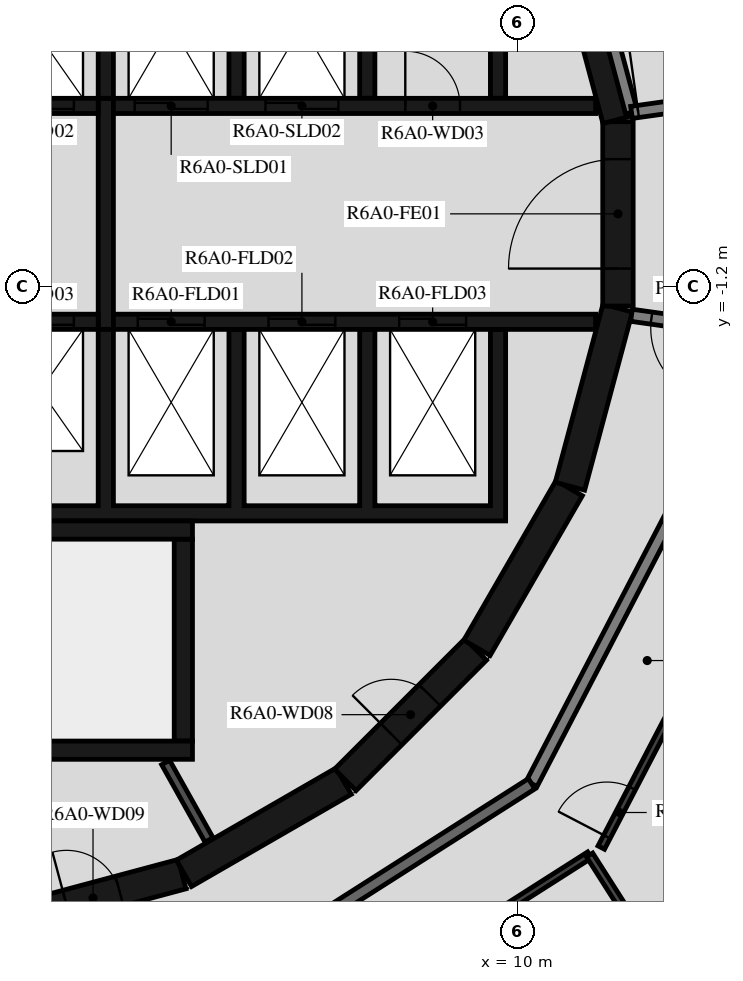
"""IFC4 building model, lengths in metres.
Left out: names, types, materials, properties, quantities, classifications, styles, units other than length and angle.
Written with IfcOpenShell. Run it as: python <this file> out.ifc"""

import sys

from ifc_helpers import new_model, si_unit, direction, frame, frame_2d, origin, place, context, subcontext, project, spatial, polyline, rectangle, outline, extrude, element, fill, save


model = new_model("IFC4")
c1 = context("Model", 3, precision=1e-05, world=origin(), true_north=direction((0.0, 1.0)))
c2 = subcontext(c1, "Body", "Model", "MODEL_VIEW")
j1 = project(units=[si_unit("LENGTHUNIT", "METRE"), si_unit("PLANEANGLEUNIT", "RADIAN")], contexts=[c1])
p1 = place(None, origin())
s1 = spatial("IfcSite", under=j1, at=p1, CompositionType="ELEMENT")
p2 = place(p1, origin())
s2 = spatial("IfcBuilding", under=s1, at=p2, CompositionType="ELEMENT")
p3 = place(p2, frame((0.0, 0.0, 226.7)))
s3 = spatial("IfcBuildingStorey", under=s2, at=p3, CompositionType="ELEMENT", Elevation=226.7)
p4 = place(p3, frame((1.55, -11.643, 0.0), z_axis=(0.0, 0.0, 1.0), x_axis=(0.965948410781, 0.258734743916, 0.0)))
e1 = element("IfcWall", 1, at=p4, inside=s3, PredefinedType="SHEAR", context=c2, shape_type="SweptSolid", body=[
    extrude(rectangle(XDim=3.033, YDim=0.5, at=frame_2d((1.516, 0.0))), origin(), (0.0, 0.0, 1.0), 3.12),
])
p5 = place(p4, frame((1.066, 0.0, 0.0)))
e2 = element("IfcOpeningElement", 2, at=p5, cuts=e1, PredefinedType="OPENING", context=c2, shape_type="SweptSolid", body=[
    extrude(rectangle(XDim=0.9, YDim=2.1, at=frame_2d((0.45, 1.05))), frame((0.0, 0.26, 0.0), z_axis=(0.0, -1.0, 0.0), x_axis=(1.0, 0.0, 0.0)), (0.0, 0.0, 1.0), 0.52),
])
p6 = place(p3, frame((4.51, -10.845, 0.0), z_axis=(0.0, 0.0, 1.0), x_axis=(0.865975092491, 0.500087131594, 0.0)))
e3 = element("IfcWall", 3, at=p6, inside=s3, PredefinedType="SHEAR", context=c2, shape_type="SweptSolid", body=[
    extrude(rectangle(XDim=3.033, YDim=0.5, at=frame_2d((1.516, 0.0))), origin(), (0.0, 0.0, 1.0), 3.12),
])
p7 = place(p3, frame((7.164, -9.308, 0.0), z_axis=(0.0, 0.0, 1.0), x_axis=(0.707106781187, 0.707106781187, 0.0)))
e4 = element("IfcWall", 4, at=p7, inside=s3, PredefinedType="SHEAR", context=c2, shape_type="SweptSolid", body=[
    extrude(rectangle(XDim=3.032, YDim=0.5, at=frame_2d((1.516, 0.0))), origin(), (0.0, 0.0, 1.0), 3.12),
])
p8 = place(p7, frame((1.066, 0.0, 0.0)))
e5 = element("IfcOpeningElement", 5, at=p8, cuts=e4, PredefinedType="OPENING", context=c2, shape_type="SweptSolid", body=[
    extrude(rectangle(XDim=0.9, YDim=2.1, at=frame_2d((0.45, 1.05))), frame((0.0, 0.26, 0.0), z_axis=(0.0, -1.0, 0.0), x_axis=(1.0, 0.0, 0.0)), (0.0, 0.0, 1.0), 0.52),
])
for number, where, z_axis, x_axis in (
    (6, (9.329, -7.137, 0.0), (0.0, 0.0, 1.0), (0.5, 0.866, 0.0)),
    (7, (10.858, -4.479, 0.0), (0.0, 0.0, 1.0), (0.259, 0.966, 0.0)),
):
    element("IfcWall", number, at=place(p3, frame(where, z_axis=z_axis, x_axis=x_axis)), inside=s3, PredefinedType="SHEAR", context=c2, shape_type="SweptSolid", body=[
        extrude(rectangle(XDim=3.033, YDim=0.5, at=frame_2d((1.516, 0.0))), origin(), (0.0, 0.0, 1.0), 3.12),
    ])
p9 = place(p3, frame((11.647, -1.516, 0.0), z_axis=(0.0, 0.0, 1.0), x_axis=(0.0, 1.0, 0.0)))
e8 = element("IfcWall", 8, at=p9, inside=s3, PredefinedType="SHEAR", context=c2, shape_type="SweptSolid", body=[
    extrude(rectangle(XDim=3.033, YDim=0.5, at=frame_2d((1.516, 0.0))), origin(), (0.0, 0.0, 1.0), 3.12),
])
p10 = place(p9, frame((0.616, 0.0, 0.0)))
e9 = element("IfcOpeningElement", 9, at=p10, cuts=e8, PredefinedType="OPENING", context=c2, shape_type="SweptSolid", body=[
    extrude(rectangle(XDim=1.8, YDim=2.1, at=frame_2d((0.9, 1.05))), frame((0.0, 0.26, 0.0), z_axis=(0.0, -1.0, 0.0), x_axis=(1.0, 0.0, 0.0)), (0.0, 0.0, 1.0), 0.52),
])
p11 = place(p3, frame((11.643, 1.55, 0.0), z_axis=(0.0, 0.0, 1.0), x_axis=(-0.258734743916, 0.965948410781, 0.0)))
e10 = element("IfcWall", 10, at=p11, inside=s3, PredefinedType="SHEAR", context=c2, shape_type="SweptSolid", body=[
    extrude(rectangle(XDim=3.033, YDim=0.5, at=frame_2d((1.516, 0.0))), origin(), (0.0, 0.0, 1.0), 3.12),
])
p12 = place(p3, frame((-2.4, -5.2, 0.0), z_axis=(0.0, 0.0, 1.0), x_axis=(1.0, 0.0, 0.0)))
e11 = element("IfcWall", 11, at=p12, inside=s3, PredefinedType="SHEAR", context=c2, shape_type="SweptSolid", body=[
    extrude(rectangle(XDim=7.05, YDim=0.3, at=frame_2d((3.525, 0.0))), origin(), (0.0, 0.0, 1.0), 3.12),
])
p13 = place(p3, frame((4.5, -8.67, 0.0), z_axis=(0.0, 0.0, 1.0), x_axis=(0.0, 1.0, 0.0)))
e12 = element("IfcWall", 12, at=p13, inside=s3, PredefinedType="SHEAR", context=c2, shape_type="SweptSolid", body=[
    extrude(rectangle(XDim=3.32, YDim=0.3, at=frame_2d((1.66, 0.0))), origin(), (0.0, 0.0, 1.0), 3.12),
])
p14 = place(p3, frame((0.1, -8.82, 0.0), z_axis=(0.0, 0.0, 1.0), x_axis=(1.0, 0.0, 0.0)))
e13 = element("IfcWall", 13, at=p14, inside=s3, PredefinedType="SHEAR", context=c2, shape_type="SweptSolid", body=[
    extrude(rectangle(XDim=4.55, YDim=0.3, at=frame_2d((2.275, 0.0))), origin(), (0.0, 0.0, 1.0), 3.12),
])
p15 = place(p3, origin())
e14 = element("IfcWall", 14, at=p15, inside=s3, PredefinedType="SHEAR", context=c2, shape_type="SweptSolid", body=[
    extrude(outline(polyline([(-9.55, 4.8), (-5.5, 4.8), (-5.5, 1.9), (-5.25, 1.9), (-5.25, 4.8), (-1.2, 4.8), (-1.2, 1.9), (-0.95, 1.9), (-0.95, 4.8), (0.95, 4.8), (0.95, 1.9), (1.2, 1.9), (1.2, 4.8), (3.1, 4.8), (3.1, 1.9), (3.35, 1.9), (3.35, 4.8), (5.25, 4.8), (5.25, 1.9), (5.5, 1.9), (5.5, 4.8), (7.4, 4.8), (7.4, 1.9), (7.65, 1.9), (7.65, 4.8), (9.55, 4.8), (9.55, 1.9), (9.8, 1.9), (9.8, 4.8), (9.8, 5.05), (-9.8, 5.05), (-9.8, 4.8), (-9.8, 1.9), (-9.55, 1.9), (-9.55, 4.8)])), origin(), (0.0, 0.0, 1.0), 3.12),
])
p16 = place(p3, origin())
e15 = element("IfcWall", 15, at=p16, inside=s3, PredefinedType="SHEAR", context=c2, shape_type="SweptSolid", body=[
    extrude(outline(polyline([(9.8, -5.05), (9.8, -4.8), (9.8, -1.9), (9.55, -1.9), (9.55, -4.8), (7.65, -4.8), (7.65, -1.9), (7.4, -1.9), (7.4, -4.8), (5.5, -4.8), (5.5, -1.9), (5.25, -1.9), (5.25, -4.8), (3.35, -4.8), (3.35, -1.9), (3.1, -1.9), (3.1, -4.8), (1.2, -4.8), (1.2, -1.9), (0.95, -1.9), (0.95, -4.8), (-0.95, -4.8), (-0.95, -1.9), (-1.2, -1.9), (-1.2, -4.8), (-5.25, -4.8), (-5.25, -1.9), (-5.5, -1.9), (-5.5, -4.8), (-7.4, -4.8), (-7.4, -1.9), (-7.65, -1.9), (-7.65, -4.8), (-9.55, -4.8), (-9.55, -1.9), (-9.8, -1.9), (-9.8, -4.8), (-9.8, -5.05), (9.8, -5.05)])), origin(), (0.0, 0.0, 1.0), 3.12),
])
p17 = place(p3, frame((-11.28, 1.775, 0.0), z_axis=(0.0, 0.0, 1.0), x_axis=(1.0, 0.0, 0.0)))
e16 = element("IfcWall", 16, at=p17, inside=s3, PredefinedType="SHEAR", context=c2, shape_type="SweptSolid", body=[
    extrude(rectangle(XDim=14.38, YDim=0.25, at=frame_2d((7.19, 0.0))), origin(), (0.0, 0.0, 1.0), 3.12),
])
p18 = place(p17, frame((10.73, 0.0, 0.0)))
e17 = element("IfcOpeningElement", 17, at=p18, cuts=e16, PredefinedType="OPENING", context=c2, shape_type="SweptSolid", body=[
    extrude(rectangle(XDim=1.1, YDim=2.1, at=frame_2d((0.55, 1.05))), frame((0.0, 0.135, 0.0), z_axis=(0.0, -1.0, 0.0), x_axis=(1.0, 0.0, 0.0)), (0.0, 0.0, 1.0), 0.27),
])
p19 = place(p17, frame((12.88, 0.0, 0.0)))
e18 = element("IfcOpeningElement", 18, at=p19, cuts=e16, PredefinedType="OPENING", context=c2, shape_type="SweptSolid", body=[
    extrude(rectangle(XDim=1.1, YDim=2.1, at=frame_2d((0.55, 1.05))), frame((0.0, 0.135, 0.0), z_axis=(0.0, -1.0, 0.0), x_axis=(1.0, 0.0, 0.0)), (0.0, 0.0, 1.0), 0.27),
])
p20 = place(p17, frame((3.305, 0.0, 0.0)))
e19 = element("IfcOpeningElement", 19, at=p20, cuts=e16, PredefinedType="OPENING", context=c2, shape_type="SweptSolid", body=[
    extrude(rectangle(XDim=0.9, YDim=2.1, at=frame_2d((0.45, 1.05))), frame((0.0, 0.135, 0.0), z_axis=(0.0, -1.0, 0.0), x_axis=(1.0, 0.0, 0.0)), (0.0, 0.0, 1.0), 0.27),
])
p21 = place(p17, frame((7.605, 0.0, 0.0)))
e20 = element("IfcOpeningElement", 20, at=p21, cuts=e16, PredefinedType="OPENING", context=c2, shape_type="SweptSolid", body=[
    extrude(rectangle(XDim=0.9, YDim=2.1, at=frame_2d((0.45, 1.05))), frame((0.0, 0.135, 0.0), z_axis=(0.0, -1.0, 0.0), x_axis=(1.0, 0.0, 0.0)), (0.0, 0.0, 1.0), 0.27),
])
p22 = place(p3, frame((3.35, 1.775, 0.0), z_axis=(0.0, 0.0, 1.0), x_axis=(1.0, 0.0, 0.0)))
e21 = element("IfcWall", 21, at=p22, inside=s3, PredefinedType="SHEAR", context=c2, shape_type="SweptSolid", body=[
    extrude(rectangle(XDim=7.93, YDim=0.25, at=frame_2d((3.965, 0.0))), origin(), (0.0, 0.0, 1.0), 3.12),
])
p23 = place(p22, frame((0.35, 0.0, 0.0)))
e22 = element("IfcOpeningElement", 22, at=p23, cuts=e21, PredefinedType="OPENING", context=c2, shape_type="SweptSolid", body=[
    extrude(rectangle(XDim=1.2, YDim=2.4, at=frame_2d((0.6, 1.2))), frame((0.0, 0.135, 0.0), z_axis=(0.0, -1.0, 0.0), x_axis=(1.0, 0.0, 0.0)), (0.0, 0.0, 1.0), 0.27),
])
p24 = place(p22, frame((2.5, 0.0, 0.0)))
e23 = element("IfcOpeningElement", 23, at=p24, cuts=e21, PredefinedType="OPENING", context=c2, shape_type="SweptSolid", body=[
    extrude(rectangle(XDim=1.2, YDim=2.4, at=frame_2d((0.6, 1.2))), frame((0.0, 0.135, 0.0), z_axis=(0.0, -1.0, 0.0), x_axis=(1.0, 0.0, 0.0)), (0.0, 0.0, 1.0), 0.27),
])
p25 = place(p22, frame((4.8, 0.0, 0.0)))
e24 = element("IfcOpeningElement", 24, at=p25, cuts=e21, PredefinedType="OPENING", context=c2, shape_type="SweptSolid", body=[
    extrude(rectangle(XDim=0.9, YDim=2.1, at=frame_2d((0.45, 1.05))), frame((0.0, 0.135, 0.0), z_axis=(0.0, -1.0, 0.0), x_axis=(1.0, 0.0, 0.0)), (0.0, 0.0, 1.0), 0.27),
])
p26 = place(p3, frame((-11.28, -1.775, 0.0), z_axis=(0.0, 0.0, 1.0), x_axis=(1.0, 0.0, 0.0)))
e25 = element("IfcWall", 25, at=p26, inside=s3, PredefinedType="SHEAR", context=c2, shape_type="SweptSolid", body=[
    extrude(rectangle(XDim=14.38, YDim=0.25, at=frame_2d((7.19, 0.0))), origin(), (0.0, 0.0, 1.0), 3.12),
])
p27 = place(p26, frame((12.88, 0.0, 0.0)))
e26 = element("IfcOpeningElement", 26, at=p27, cuts=e25, PredefinedType="OPENING", context=c2, shape_type="SweptSolid", body=[
    extrude(rectangle(XDim=1.1, YDim=2.1, at=frame_2d((0.55, 1.05))), frame((0.0, 0.135, 0.0), z_axis=(0.0, -1.0, 0.0), x_axis=(1.0, 0.0, 0.0)), (0.0, 0.0, 1.0), 0.27),
])
p28 = place(p26, frame((7.605, 0.0, 0.0)))
e27 = element("IfcOpeningElement", 27, at=p28, cuts=e25, PredefinedType="OPENING", context=c2, shape_type="SweptSolid", body=[
    extrude(rectangle(XDim=0.9, YDim=2.1, at=frame_2d((0.45, 1.05))), frame((0.0, 0.135, 0.0), z_axis=(0.0, -1.0, 0.0), x_axis=(1.0, 0.0, 0.0)), (0.0, 0.0, 1.0), 0.27),
])
p29 = place(p26, frame((10.83, 0.0, 0.0)))
e28 = element("IfcOpeningElement", 28, at=p29, cuts=e25, PredefinedType="OPENING", context=c2, shape_type="SweptSolid", body=[
    extrude(rectangle(XDim=0.9, YDim=2.1, at=frame_2d((0.45, 1.05))), frame((0.0, 0.135, 0.0), z_axis=(0.0, -1.0, 0.0), x_axis=(1.0, 0.0, 0.0)), (0.0, 0.0, 1.0), 0.27),
])
p30 = place(p3, frame((3.35, -1.775, 0.0), z_axis=(0.0, 0.0, 1.0), x_axis=(1.0, 0.0, 0.0)))
e29 = element("IfcWall", 29, at=p30, inside=s3, PredefinedType="SHEAR", context=c2, shape_type="SweptSolid", body=[
    extrude(rectangle(XDim=7.93, YDim=0.25, at=frame_2d((3.965, 0.0))), origin(), (0.0, 0.0, 1.0), 3.12),
])
p31 = place(p30, frame((0.4, 0.0, 0.0)))
e30 = element("IfcOpeningElement", 30, at=p31, cuts=e29, PredefinedType="OPENING", context=c2, shape_type="SweptSolid", body=[
    extrude(rectangle(XDim=1.1, YDim=2.4, at=frame_2d((0.55, 1.2))), frame((0.0, 0.135, 0.0), z_axis=(0.0, -1.0, 0.0), x_axis=(1.0, 0.0, 0.0)), (0.0, 0.0, 1.0), 0.27),
])
p32 = place(p30, frame((2.55, 0.0, 0.0)))
e31 = element("IfcOpeningElement", 31, at=p32, cuts=e29, PredefinedType="OPENING", context=c2, shape_type="SweptSolid", body=[
    extrude(rectangle(XDim=1.1, YDim=2.4, at=frame_2d((0.55, 1.2))), frame((0.0, 0.135, 0.0), z_axis=(0.0, -1.0, 0.0), x_axis=(1.0, 0.0, 0.0)), (0.0, 0.0, 1.0), 0.27),
])
p33 = place(p30, frame((4.7, 0.0, 0.0)))
e32 = element("IfcOpeningElement", 32, at=p33, cuts=e29, PredefinedType="OPENING", context=c2, shape_type="SweptSolid", body=[
    extrude(rectangle(XDim=1.1, YDim=2.4, at=frame_2d((0.55, 1.2))), frame((0.0, 0.135, 0.0), z_axis=(0.0, -1.0, 0.0), x_axis=(1.0, 0.0, 0.0)), (0.0, 0.0, 1.0), 0.27),
])
p34 = place(p3, frame((3.225, -1.9, 0.0), z_axis=(0.0, 0.0, 1.0), x_axis=(0.0, 1.0, 0.0)))
e33 = element("IfcWall", 33, at=p34, inside=s3, PredefinedType="SHEAR", context=c2, shape_type="SweptSolid", body=[
    extrude(rectangle(XDim=3.8, YDim=0.25, at=frame_2d((1.9, 0.0))), origin(), (0.0, 0.0, 1.0), 3.12),
])
p35 = place(p3, frame((4.922, -10.296, 0.0), z_axis=(0.0, 0.0, 1.0), x_axis=(-0.48860846254, 0.872503163509, 0.0)))
e34 = element("IfcWall", 34, at=p35, inside=s3, PredefinedType="PARTITIONING", context=c2, shape_type="SweptSolid", body=[
    extrude(rectangle(XDim=1.459, YDim=0.15, at=frame_2d((0.73, 0.0))), origin(), (0.0, 0.0, 1.0), 3.12),
])
p36 = place(p3, frame((11.87, 1.668, 0.0), z_axis=(0.0, 0.0, 1.0), x_axis=(-0.258836880648, 0.965921047093, 0.0)))
e35 = element("IfcWall", 35, at=p36, inside=s3, PredefinedType="STANDARD", context=c2, shape_type="SweptSolid", body=[
    extrude(rectangle(XDim=1.695, YDim=0.2, at=frame_2d((0.848, 0.0))), origin(), (0.0, 0.0, 1.0), 3.12),
])
p37 = place(p3, frame((11.87, 1.668, 0.0), z_axis=(0.0, 0.0, 1.0), x_axis=(0.990267985606, 0.139173692496, 0.0)))
e36 = element("IfcWall", 36, at=p37, inside=s3, PredefinedType="STANDARD", context=c2, shape_type="SweptSolid", body=[
    extrude(rectangle(XDim=1.475, YDim=0.2, at=frame_2d((0.738, 0.0))), origin(), (0.0, 0.0, 1.0), 3.12),
])
p38 = place(p37, frame((0.11, 0.0, 0.0)))
e37 = element("IfcOpeningElement", 37, at=p38, cuts=e36, PredefinedType="OPENING", context=c2, shape_type="SweptSolid", body=[
    extrude(rectangle(XDim=1.2, YDim=2.1, at=frame_2d((0.6, 1.05))), frame((0.0, 0.11, 0.0), z_axis=(0.0, -1.0, 0.0), x_axis=(1.0, 0.0, 0.0)), (0.0, 0.0, 1.0), 0.22),
])
p39 = place(p3, frame((10.228, -9.372, 0.0), z_axis=(0.0, 0.0, 1.0), x_axis=(0.461759464021, 0.887005184532, 0.0)))
e38 = element("IfcWall", 38, at=p39, inside=s3, PredefinedType="STANDARD", context=c2, shape_type="SweptSolid", body=[
    extrude(rectangle(XDim=7.181, YDim=0.2, at=frame_2d((3.591, 0.0))), origin(), (0.0, 0.0, 1.0), 3.12),
])
p40 = place(p3, frame((13.496, -1.897, 0.0), z_axis=(0.0, 0.0, 1.0), x_axis=(-0.99026234641, 0.139213811391, 0.0)))
e39 = element("IfcWall", 39, at=p40, inside=s3, PredefinedType="STANDARD", context=c2, shape_type="SweptSolid", body=[
    extrude(rectangle(XDim=1.641, YDim=0.2, at=frame_2d((0.821, 0.0))), origin(), (0.0, 0.0, 1.0), 3.12),
])
p41 = place(p40, frame((0.11, 0.0, 0.0)))
e40 = element("IfcOpeningElement", 40, at=p41, cuts=e39, PredefinedType="OPENING", context=c2, shape_type="SweptSolid", body=[
    extrude(rectangle(XDim=1.2, YDim=2.1, at=frame_2d((0.6, 1.05))), frame((0.0, 0.11, 0.0), z_axis=(0.0, -1.0, 0.0), x_axis=(1.0, 0.0, 0.0)), (0.0, 0.0, 1.0), 0.22),
])
p42 = place(p3, frame((4.172, -13.231, 0.0), z_axis=(0.0, 0.0, 1.0), x_axis=(0.843388394728, 0.537304397561, 0.0)))
e41 = element("IfcWall", 41, at=p42, inside=s3, PredefinedType="STANDARD", context=c2, shape_type="SweptSolid", body=[
    extrude(rectangle(XDim=7.181, YDim=0.2, at=frame_2d((3.59, 0.0))), origin(), (0.0, 0.0, 1.0), 3.12),
])
p43 = place(p42, frame((0.2, 0.0, 0.0)))
e42 = element("IfcOpeningElement", 42, at=p43, cuts=e41, PredefinedType="OPENING", context=c2, shape_type="SweptSolid", body=[
    extrude(rectangle(XDim=1.0, YDim=2.1, at=frame_2d((0.5, 1.05))), frame((0.0, 0.11, 0.0), z_axis=(0.0, -1.0, 0.0), x_axis=(1.0, 0.0, 0.0)), (0.0, 0.0, 1.0), 0.22),
])
p44 = place(p3, frame((4.83, -14.59, 0.0), z_axis=(0.0, 0.0, 1.0), x_axis=(0.843393042763, 0.537297101629, 0.0)))
e43 = element("IfcWall", 43, at=p44, inside=s3, PredefinedType="PARTITIONING", context=c2, shape_type="SweptSolid", body=[
    extrude(rectangle(XDim=7.53, YDim=0.12, at=frame_2d((3.765, 0.0))), origin(), (0.0, 0.0, 1.0), 3.12),
])
p45 = place(p44, frame((0.2, 0.0, 0.0)))
e44 = element("IfcOpeningElement", 44, at=p45, cuts=e43, PredefinedType="OPENING", context=c2, shape_type="SweptSolid", body=[
    extrude(rectangle(XDim=0.9, YDim=2.1, at=frame_2d((0.45, 1.05))), frame((0.0, 0.07, 0.0), z_axis=(0.0, -1.0, 0.0), x_axis=(1.0, 0.0, 0.0)), (0.0, 0.0, 1.0), 0.14),
])
p46 = place(p3, frame((11.373, -10.421, 0.0), z_axis=(0.0, 0.0, 1.0), x_axis=(0.461738939635, 0.887015868869, 0.0)))
e45 = element("IfcWall", 45, at=p46, inside=s3, PredefinedType="PARTITIONING", context=c2, shape_type="SweptSolid", body=[
    extrude(rectangle(XDim=5.752, YDim=0.12, at=frame_2d((2.876, 0.0))), origin(), (0.0, 0.0, 1.0), 3.12),
])
p47 = place(p46, frame((0.2, 0.0, 0.0)))
e46 = element("IfcOpeningElement", 46, at=p47, cuts=e45, PredefinedType="OPENING", context=c2, shape_type="SweptSolid", body=[
    extrude(rectangle(XDim=0.9, YDim=2.1, at=frame_2d((0.45, 1.05))), frame((0.0, 0.07, 0.0), z_axis=(0.0, -1.0, 0.0), x_axis=(1.0, 0.0, 0.0)), (0.0, 0.0, 1.0), 0.14),
])
p48 = place(p3, frame((12.758, -13.018, 0.0), z_axis=(0.0, 0.0, 1.0), x_axis=(-0.537338423153, 0.843366716798, 0.0)))
e47 = element("IfcWall", 47, at=p48, inside=s3, PredefinedType="PARTITIONING", context=c2, shape_type="SweptSolid", body=[
    extrude(rectangle(XDim=2.934, YDim=0.12, at=frame_2d((1.467, 0.0))), origin(), (0.0, 0.0, 1.0), 2.73),
])
p49 = place(p10, origin())
e48 = element("IfcDoor", 48, at=p49, inside=s3, OperationType="DOUBLE_DOOR_SINGLE_SWING", PredefinedType="DOOR", context=c2, shape_type="SweptSolid", body=[
    extrude(rectangle(XDim=1.8, YDim=2.1, at=frame_2d((0.9, 1.05))), frame((0.0, 0.025, 0.0), z_axis=(0.0, -1.0, 0.0), x_axis=(1.0, 0.0, 0.0)), (0.0, 0.0, 1.0), 0.05),
])
fill(e9, e48)
p50 = place(p19, origin())
e49 = element("IfcDoor", 49, at=p50, inside=s3, OperationType="DOUBLE_DOOR_SLIDING", PredefinedType="DOOR", context=c2, shape_type="SweptSolid", body=[
    extrude(rectangle(XDim=1.1, YDim=2.1, at=frame_2d((0.55, 1.05))), frame((0.0, 0.025, 0.0), z_axis=(0.0, -1.0, 0.0), x_axis=(1.0, 0.0, 0.0)), (0.0, 0.0, 1.0), 0.05),
])
fill(e18, e49)
p51 = place(p23, origin())
e50 = element("IfcDoor", 50, at=p51, inside=s3, OperationType="DOUBLE_DOOR_SLIDING", PredefinedType="DOOR", context=c2, shape_type="SweptSolid", body=[
    extrude(rectangle(XDim=1.2, YDim=2.4, at=frame_2d((0.6, 1.2))), frame((0.0, 0.025, 0.0), z_axis=(0.0, -1.0, 0.0), x_axis=(1.0, 0.0, 0.0)), (0.0, 0.0, 1.0), 0.05),
])
fill(e22, e50)
p52 = place(p24, origin())
e51 = element("IfcDoor", 51, at=p52, inside=s3, OperationType="DOUBLE_DOOR_SLIDING", PredefinedType="DOOR", context=c2, shape_type="SweptSolid", body=[
    extrude(rectangle(XDim=1.2, YDim=2.4, at=frame_2d((0.6, 1.2))), frame((0.0, 0.025, 0.0), z_axis=(0.0, -1.0, 0.0), x_axis=(1.0, 0.0, 0.0)), (0.0, 0.0, 1.0), 0.05),
])
fill(e23, e51)
p53 = place(p27, origin())
e52 = element("IfcDoor", 52, at=p53, inside=s3, OperationType="DOUBLE_DOOR_SLIDING", PredefinedType="DOOR", context=c2, shape_type="SweptSolid", body=[
    extrude(rectangle(XDim=1.1, YDim=2.1, at=frame_2d((0.55, 1.05))), frame((0.0, 0.025, 0.0), z_axis=(0.0, -1.0, 0.0), x_axis=(1.0, 0.0, 0.0)), (0.0, 0.0, 1.0), 0.05),
])
fill(e26, e52)
p54 = place(p31, origin())
e53 = element("IfcDoor", 53, at=p54, inside=s3, OperationType="DOUBLE_DOOR_SLIDING", PredefinedType="DOOR", context=c2, shape_type="SweptSolid", body=[
    extrude(rectangle(XDim=1.1, YDim=2.4, at=frame_2d((0.55, 1.2))), frame((0.0, 0.025, 0.0), z_axis=(0.0, -1.0, 0.0), x_axis=(1.0, 0.0, 0.0)), (0.0, 0.0, 1.0), 0.05),
])
fill(e30, e53)
p55 = place(p32, origin())
e54 = element("IfcDoor", 54, at=p55, inside=s3, OperationType="DOUBLE_DOOR_SLIDING", PredefinedType="DOOR", context=c2, shape_type="SweptSolid", body=[
    extrude(rectangle(XDim=1.1, YDim=2.4, at=frame_2d((0.55, 1.2))), frame((0.0, 0.025, 0.0), z_axis=(0.0, -1.0, 0.0), x_axis=(1.0, 0.0, 0.0)), (0.0, 0.0, 1.0), 0.05),
])
fill(e31, e54)
p56 = place(p33, origin())
e55 = element("IfcDoor", 55, at=p56, inside=s3, OperationType="DOUBLE_DOOR_SLIDING", PredefinedType="DOOR", context=c2, shape_type="SweptSolid", body=[
    extrude(rectangle(XDim=1.1, YDim=2.4, at=frame_2d((0.55, 1.2))), frame((0.0, 0.025, 0.0), z_axis=(0.0, -1.0, 0.0), x_axis=(1.0, 0.0, 0.0)), (0.0, 0.0, 1.0), 0.05),
])
fill(e32, e55)
p57 = place(p25, origin())
e56 = element("IfcDoor", 56, at=p57, inside=s3, OperationType="SINGLE_SWING_LEFT", PredefinedType="DOOR", context=c2, shape_type="SweptSolid", body=[
    extrude(rectangle(XDim=0.9, YDim=2.1, at=frame_2d((0.45, 1.05))), frame((0.0, 0.025, 0.0), z_axis=(0.0, -1.0, 0.0), x_axis=(1.0, 0.0, 0.0)), (0.0, 0.0, 1.0), 0.05),
])
fill(e24, e56)
p58 = place(p8, origin())
e57 = element("IfcDoor", 57, at=p58, inside=s3, OperationType="SINGLE_SWING_RIGHT", PredefinedType="DOOR", context=c2, shape_type="SweptSolid", body=[
    extrude(rectangle(XDim=0.9, YDim=2.1, at=frame_2d((0.45, 1.05))), frame((0.0, 0.025, 0.0), z_axis=(0.0, -1.0, 0.0), x_axis=(1.0, 0.0, 0.0)), (0.0, 0.0, 1.0), 0.05),
])
fill(e5, e57)
p59 = place(p5, origin())
e58 = element("IfcDoor", 58, at=p59, inside=s3, OperationType="SINGLE_SWING_LEFT", PredefinedType="DOOR", context=c2, shape_type="SweptSolid", body=[
    extrude(rectangle(XDim=0.9, YDim=2.1, at=frame_2d((0.45, 1.05))), frame((0.0, 0.025, 0.0), z_axis=(0.0, -1.0, 0.0), x_axis=(1.0, 0.0, 0.0)), (0.0, 0.0, 1.0), 0.05),
])
fill(e2, e58)
p60 = place(p47, origin())
e59 = element("IfcDoor", 59, at=p60, inside=s3, OperationType="SINGLE_SWING_RIGHT", PredefinedType="DOOR", context=c2, shape_type="SweptSolid", body=[
    extrude(rectangle(XDim=0.9, YDim=2.1, at=frame_2d((0.45, 1.05))), frame((0.0, 0.025, 0.0), z_axis=(0.0, -1.0, 0.0), x_axis=(1.0, 0.0, 0.0)), (0.0, 0.0, 1.0), 0.05),
])
fill(e46, e59)
p61 = place(p38, origin())
e60 = element("IfcDoor", 60, at=p61, inside=s3, OperationType="DOUBLE_DOOR_SINGLE_SWING", PredefinedType="DOOR", context=c2, shape_type="SweptSolid", body=[
    extrude(rectangle(XDim=1.2, YDim=2.1, at=frame_2d((0.6, 1.05))), frame((0.0, 0.025, 0.0), z_axis=(0.0, -1.0, 0.0), x_axis=(1.0, 0.0, 0.0)), (0.0, 0.0, 1.0), 0.05),
])
fill(e37, e60)
p62 = place(p41, origin())
e61 = element("IfcDoor", 61, at=p62, inside=s3, OperationType="DOUBLE_DOOR_SINGLE_SWING", PredefinedType="DOOR", context=c2, shape_type="SweptSolid", body=[
    extrude(rectangle(XDim=1.2, YDim=2.1, at=frame_2d((0.6, 1.05))), frame((0.0, 0.025, 0.0), z_axis=(0.0, -1.0, 0.0), x_axis=(1.0, 0.0, 0.0)), (0.0, 0.0, 1.0), 0.05),
])
fill(e40, e61)
save(model, sys.argv[1])
